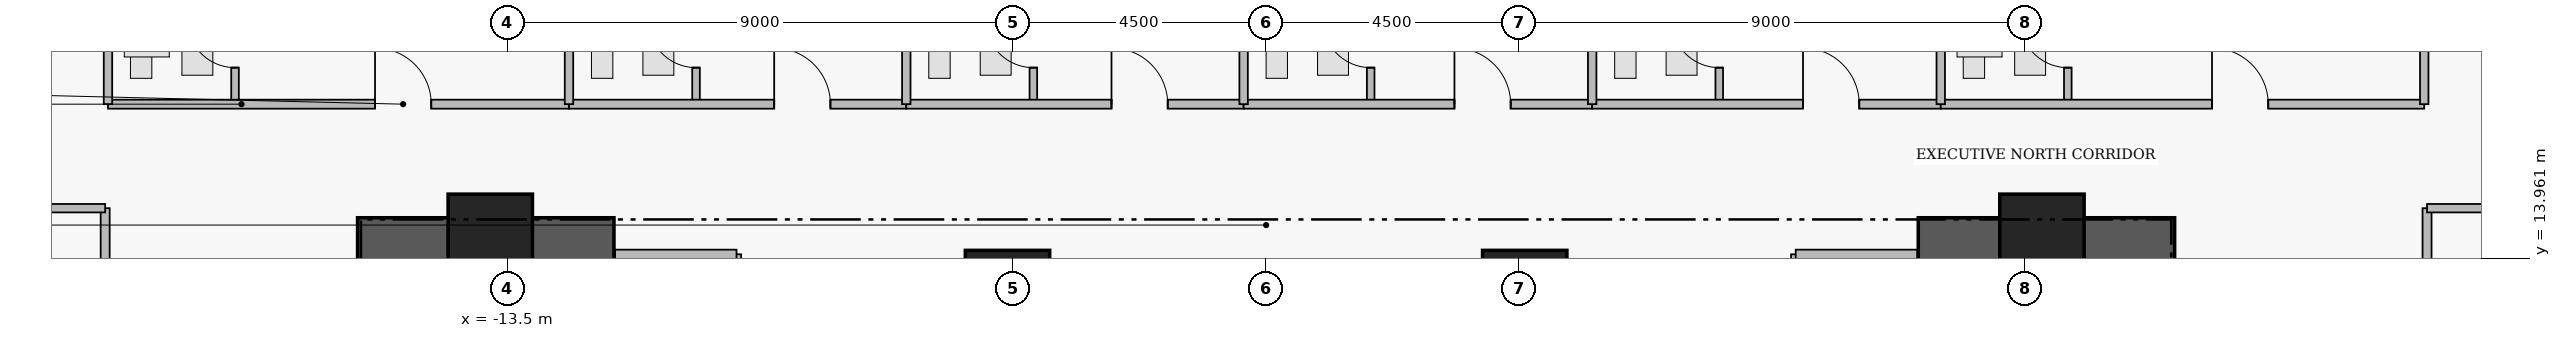
"""IFC4 building model, lengths in metres.
Left out: names, types, materials, properties, quantities, classifications, styles, units other than length and angle.
Written with IfcOpenShell. Run it as: python <this file> out.ifc"""

import sys

from ifc_helpers import new_model, si_unit, direction, frame, frame_2d, origin, origin_2d, place, context, subcontext, project, spatial, rectangle, extrude, element, fill, save


model = new_model("IFC4")
c1 = context("Model", 3, precision=1e-05, world=origin(), true_north=direction((0.0, 1.0)))
c2 = subcontext(c1, "Body", "Model", "MODEL_VIEW")
j1 = project(units=[si_unit("LENGTHUNIT", "METRE"), si_unit("PLANEANGLEUNIT", "RADIAN")], contexts=[c1])
p1 = place(None, origin())
s1 = spatial("IfcSite", under=j1, at=p1, CompositionType="ELEMENT")
p2 = place(p1, origin())
s2 = spatial("IfcBuilding", under=s1, at=p2, CompositionType="ELEMENT")
p3 = place(p2, frame((0.0, 0.0, 95.65)))
s3 = spatial("IfcBuildingStorey", under=s2, at=p3, CompositionType="ELEMENT", Elevation=95.65)
for number, where, z_axis, x_axis in (
    (1, (-16.16, 14.305, 0.0), (0.0, 0.0, 1.0), (1.0, 0.0, 0.0)),
    (2, (11.6, 14.305, 0.0), (0.0, 0.0, 1.0), (1.0, 0.0, 0.0)),
):
    element("IfcWall", number, at=place(p3, frame(where, z_axis=z_axis, x_axis=x_axis)), inside=s3, PredefinedType="SHEAR", context=c2, shape_type="SweptSolid", body=[
        extrude(rectangle(XDim=4.56, YDim=0.75, at=frame_2d((2.28, 0.0))), origin(), (0.0, 0.0, 1.0), 3.46),
    ])
for number, where, z_axis, x_axis in (
    (3, (-13.8, 14.35, 0.0), (0.0, 0.0, 1.0), (1.0, 0.0, 0.0)),
    (4, (-4.6, 13.35, 0.0), (0.0, 0.0, 1.0), (1.0, 0.0, 0.0)),
    (5, (4.6, 13.35, 0.0), (0.0, 0.0, 1.0), (1.0, 0.0, 0.0)),
    (6, (13.8, 14.35, 0.0), (0.0, 0.0, 1.0), (1.0, 0.0, 0.0)),
):
    element("IfcColumn", number, at=place(p3, frame(where, z_axis=z_axis, x_axis=x_axis)), inside=s3, PredefinedType="COLUMN", context=c2, shape_type="SweptSolid", body=[
        extrude(rectangle(XDim=1.5, YDim=1.5, at=origin_2d()), origin(), (0.0, 0.0, 1.0), 3.65),
    ])
p4 = place(p3, frame((-18.34, 16.7, 0.0), z_axis=(0.0, 0.0, 1.0), x_axis=(0.0, 1.0, 0.0)))
e7 = element("IfcWall", 7, at=p4, inside=s3, PredefinedType="PLUMBINGWALL", context=c2, shape_type="SweptSolid", body=[
    extrude(rectangle(XDim=2.36, YDim=0.135, at=frame_2d((1.18, 0.0))), origin(), (0.0, 0.0, 1.0), 3.43),
])
p5 = place(p4, frame((0.65, 0.0, 0.0)))
e8 = element("IfcOpeningElement", 8, at=p5, cuts=e7, PredefinedType="OPENING", context=c2, shape_type="SweptSolid", body=[
    extrude(rectangle(XDim=0.85, YDim=2.1, at=frame_2d((0.425, 1.05))), frame((0.0, 0.077, 0.0), z_axis=(0.0, -1.0, 0.0), x_axis=(1.0, 0.0, 0.0)), (0.0, 0.0, 1.0), 0.155),
])
p6 = place(p3, frame((-20.6, 16.7, 0.0), z_axis=(0.0, 0.0, 1.0), x_axis=(1.0, 0.0, 0.0)))
e9 = element("IfcWall", 9, at=p6, inside=s3, PredefinedType="PARTITIONING", context=c2, shape_type="SweptSolid", body=[
    extrude(rectangle(XDim=8.2, YDim=0.16, at=frame_2d((4.1, 0.0))), origin(), (0.0, 0.0, 1.0), 2.973),
])
p7 = place(p6, frame((4.75, 0.0, 0.0)))
e10 = element("IfcOpeningElement", 10, at=p7, cuts=e9, PredefinedType="OPENING", context=c2, shape_type="SweptSolid", body=[
    extrude(rectangle(XDim=1.0, YDim=2.15, at=frame_2d((0.5, 1.075))), frame((0.0, 0.09, 0.0), z_axis=(0.0, -1.0, 0.0), x_axis=(1.0, 0.0, 0.0)), (0.0, 0.0, 1.0), 0.18),
])
p8 = place(p3, frame((-10.14, 16.7, 0.0), z_axis=(0.0, 0.0, 1.0), x_axis=(0.0, 1.0, 0.0)))
e11 = element("IfcWall", 11, at=p8, inside=s3, PredefinedType="PLUMBINGWALL", context=c2, shape_type="SweptSolid", body=[
    extrude(rectangle(XDim=2.36, YDim=0.135, at=frame_2d((1.18, 0.0))), origin(), (0.0, 0.0, 1.0), 3.43),
])
p9 = place(p8, frame((0.65, 0.0, 0.0)))
e12 = element("IfcOpeningElement", 12, at=p9, cuts=e11, PredefinedType="OPENING", context=c2, shape_type="SweptSolid", body=[
    extrude(rectangle(XDim=0.85, YDim=2.1, at=frame_2d((0.425, 1.05))), frame((0.0, 0.077, 0.0), z_axis=(0.0, -1.0, 0.0), x_axis=(1.0, 0.0, 0.0)), (0.0, 0.0, 1.0), 0.155),
])
p10 = place(p3, frame((-12.4, 16.7, 0.0), z_axis=(0.0, 0.0, 1.0), x_axis=(1.0, 0.0, 0.0)))
e13 = element("IfcWall", 13, at=p10, inside=s3, PredefinedType="PARTITIONING", context=c2, shape_type="SweptSolid", body=[
    extrude(rectangle(XDim=6.0, YDim=0.16, at=frame_2d((3.0, 0.0))), origin(), (0.0, 0.0, 1.0), 2.973),
])
p11 = place(p10, frame((3.65, 0.0, 0.0)))
e14 = element("IfcOpeningElement", 14, at=p11, cuts=e13, PredefinedType="OPENING", context=c2, shape_type="SweptSolid", body=[
    extrude(rectangle(XDim=1.0, YDim=2.15, at=frame_2d((0.5, 1.075))), frame((0.0, 0.09, 0.0), z_axis=(0.0, -1.0, 0.0), x_axis=(1.0, 0.0, 0.0)), (0.0, 0.0, 1.0), 0.18),
])
p12 = place(p3, frame((-4.14, 16.7, 0.0), z_axis=(0.0, 0.0, 1.0), x_axis=(0.0, 1.0, 0.0)))
e15 = element("IfcWall", 15, at=p12, inside=s3, PredefinedType="PLUMBINGWALL", context=c2, shape_type="SweptSolid", body=[
    extrude(rectangle(XDim=2.36, YDim=0.135, at=frame_2d((1.18, 0.0))), origin(), (0.0, 0.0, 1.0), 2.503),
])
p13 = place(p12, frame((0.65, 0.0, 0.0)))
e16 = element("IfcOpeningElement", 16, at=p13, cuts=e15, PredefinedType="OPENING", context=c2, shape_type="SweptSolid", body=[
    extrude(rectangle(XDim=0.85, YDim=2.1, at=frame_2d((0.425, 1.05))), frame((0.0, 0.077, 0.0), z_axis=(0.0, -1.0, 0.0), x_axis=(1.0, 0.0, 0.0)), (0.0, 0.0, 1.0), 0.155),
])
p14 = place(p3, frame((-6.4, 16.7, 0.0), z_axis=(0.0, 0.0, 1.0), x_axis=(1.0, 0.0, 0.0)))
e17 = element("IfcWall", 17, at=p14, inside=s3, PredefinedType="PARTITIONING", context=c2, shape_type="SweptSolid", body=[
    extrude(rectangle(XDim=6.0, YDim=0.16, at=frame_2d((3.0, 0.0))), origin(), (0.0, 0.0, 1.0), 2.973),
])
p15 = place(p14, frame((3.65, 0.0, 0.0)))
e18 = element("IfcOpeningElement", 18, at=p15, cuts=e17, PredefinedType="OPENING", context=c2, shape_type="SweptSolid", body=[
    extrude(rectangle(XDim=1.0, YDim=2.15, at=frame_2d((0.5, 1.075))), frame((0.0, 0.09, 0.0), z_axis=(0.0, -1.0, 0.0), x_axis=(1.0, 0.0, 0.0)), (0.0, 0.0, 1.0), 0.18),
])
p16 = place(p3, frame((1.86, 16.7, 0.0), z_axis=(0.0, 0.0, 1.0), x_axis=(0.0, 1.0, 0.0)))
e19 = element("IfcWall", 19, at=p16, inside=s3, PredefinedType="PLUMBINGWALL", context=c2, shape_type="SweptSolid", body=[
    extrude(rectangle(XDim=2.36, YDim=0.135, at=frame_2d((1.18, 0.0))), origin(), (0.0, 0.0, 1.0), 3.43),
])
p17 = place(p16, frame((0.65, 0.0, 0.0)))
e20 = element("IfcOpeningElement", 20, at=p17, cuts=e19, PredefinedType="OPENING", context=c2, shape_type="SweptSolid", body=[
    extrude(rectangle(XDim=0.85, YDim=2.1, at=frame_2d((0.425, 1.05))), frame((0.0, 0.077, 0.0), z_axis=(0.0, -1.0, 0.0), x_axis=(1.0, 0.0, 0.0)), (0.0, 0.0, 1.0), 0.155),
])
p18 = place(p3, frame((-0.4, 16.7, 0.0), z_axis=(0.0, 0.0, 1.0), x_axis=(1.0, 0.0, 0.0)))
e21 = element("IfcWall", 21, at=p18, inside=s3, PredefinedType="PARTITIONING", context=c2, shape_type="SweptSolid", body=[
    extrude(rectangle(XDim=6.2, YDim=0.16, at=frame_2d((3.1, 0.0))), origin(), (0.0, 0.0, 1.0), 2.973),
])
p19 = place(p18, frame((3.75, 0.0, 0.0)))
e22 = element("IfcOpeningElement", 22, at=p19, cuts=e21, PredefinedType="OPENING", context=c2, shape_type="SweptSolid", body=[
    extrude(rectangle(XDim=1.0, YDim=2.15, at=frame_2d((0.5, 1.075))), frame((0.0, 0.09, 0.0), z_axis=(0.0, -1.0, 0.0), x_axis=(1.0, 0.0, 0.0)), (0.0, 0.0, 1.0), 0.18),
])
p20 = place(p3, frame((8.06, 16.7, 0.0), z_axis=(0.0, 0.0, 1.0), x_axis=(0.0, 1.0, 0.0)))
e23 = element("IfcWall", 23, at=p20, inside=s3, PredefinedType="PLUMBINGWALL", context=c2, shape_type="SweptSolid", body=[
    extrude(rectangle(XDim=2.36, YDim=0.135, at=frame_2d((1.18, 0.0))), origin(), (0.0, 0.0, 1.0), 3.43),
])
p21 = place(p20, frame((0.65, 0.0, 0.0)))
e24 = element("IfcOpeningElement", 24, at=p21, cuts=e23, PredefinedType="OPENING", context=c2, shape_type="SweptSolid", body=[
    extrude(rectangle(XDim=0.85, YDim=2.1, at=frame_2d((0.425, 1.05))), frame((0.0, 0.077, 0.0), z_axis=(0.0, -1.0, 0.0), x_axis=(1.0, 0.0, 0.0)), (0.0, 0.0, 1.0), 0.155),
])
p22 = place(p3, frame((5.8, 16.7, 0.0), z_axis=(0.0, 0.0, 1.0), x_axis=(1.0, 0.0, 0.0)))
e25 = element("IfcWall", 25, at=p22, inside=s3, PredefinedType="PARTITIONING", context=c2, shape_type="SweptSolid", body=[
    extrude(rectangle(XDim=6.2, YDim=0.16, at=frame_2d((3.1, 0.0))), origin(), (0.0, 0.0, 1.0), 2.973),
])
p23 = place(p22, frame((3.75, 0.0, 0.0)))
e26 = element("IfcOpeningElement", 26, at=p23, cuts=e25, PredefinedType="OPENING", context=c2, shape_type="SweptSolid", body=[
    extrude(rectangle(XDim=1.0, YDim=2.15, at=frame_2d((0.5, 1.075))), frame((0.0, 0.09, 0.0), z_axis=(0.0, -1.0, 0.0), x_axis=(1.0, 0.0, 0.0)), (0.0, 0.0, 1.0), 0.18),
])
p24 = place(p3, frame((14.26, 16.7, 0.0), z_axis=(0.0, 0.0, 1.0), x_axis=(0.0, 1.0, 0.0)))
e27 = element("IfcWall", 27, at=p24, inside=s3, PredefinedType="PLUMBINGWALL", context=c2, shape_type="SweptSolid", body=[
    extrude(rectangle(XDim=2.36, YDim=0.135, at=frame_2d((1.18, 0.0))), origin(), (0.0, 0.0, 1.0), 2.503),
])
p25 = place(p24, frame((0.65, 0.0, 0.0)))
e28 = element("IfcOpeningElement", 28, at=p25, cuts=e27, PredefinedType="OPENING", context=c2, shape_type="SweptSolid", body=[
    extrude(rectangle(XDim=0.85, YDim=2.1, at=frame_2d((0.425, 1.05))), frame((0.0, 0.077, 0.0), z_axis=(0.0, -1.0, 0.0), x_axis=(1.0, 0.0, 0.0)), (0.0, 0.0, 1.0), 0.155),
])
p26 = place(p3, frame((12.0, 16.7, 0.0), z_axis=(0.0, 0.0, 1.0), x_axis=(1.0, 0.0, 0.0)))
e29 = element("IfcWall", 29, at=p26, inside=s3, PredefinedType="PARTITIONING", context=c2, shape_type="SweptSolid", body=[
    extrude(rectangle(XDim=8.6, YDim=0.16, at=frame_2d((4.3, 0.0))), origin(), (0.0, 0.0, 1.0), 2.973),
])
p27 = place(p26, frame((4.825, 0.0, 0.0)))
e30 = element("IfcOpeningElement", 30, at=p27, cuts=e29, PredefinedType="OPENING", context=c2, shape_type="SweptSolid", body=[
    extrude(rectangle(XDim=1.0, YDim=2.15, at=frame_2d((0.5, 1.075))), frame((0.0, 0.09, 0.0), z_axis=(0.0, -1.0, 0.0), x_axis=(1.0, 0.0, 0.0)), (0.0, 0.0, 1.0), 0.18),
])
p28 = place(p3, frame((20.65, 7.96, 0.0), z_axis=(0.0, 0.0, 1.0), x_axis=(0.0, 1.0, 0.0)))
e31 = element("IfcWall", 31, at=p28, inside=s3, PredefinedType="PARTITIONING", context=c2, shape_type="SweptSolid", body=[
    extrude(rectangle(XDim=6.89, YDim=0.16, at=frame_2d((3.445, 0.0))), origin(), (0.0, 0.0, 1.0), 3.43),
])
p29 = place(p28, frame((2.985, 0.0, 0.0)))
e32 = element("IfcOpeningElement", 32, at=p29, cuts=e31, PredefinedType="OPENING", context=c2, shape_type="SweptSolid", body=[
    extrude(rectangle(XDim=0.92, YDim=2.12, at=frame_2d((0.46, 1.06))), frame((0.0, 0.09, 0.0), z_axis=(0.0, -1.0, 0.0), x_axis=(1.0, 0.0, 0.0)), (0.0, 0.0, 1.0), 0.18),
])
p30 = place(p3, frame((-20.65, 8.06, 0.0), z_axis=(0.0, 0.0, 1.0), x_axis=(0.0, 1.0, 0.0)))
e33 = element("IfcWall", 33, at=p30, inside=s3, PredefinedType="PARTITIONING", context=c2, shape_type="SweptSolid", body=[
    extrude(rectangle(XDim=6.79, YDim=0.16, at=frame_2d((3.395, 0.0))), origin(), (0.0, 0.0, 1.0), 3.43),
])
p31 = place(p30, frame((2.92, 0.0, 0.0)))
e34 = element("IfcOpeningElement", 34, at=p31, cuts=e33, PredefinedType="OPENING", context=c2, shape_type="SweptSolid", body=[
    extrude(rectangle(XDim=0.95, YDim=2.15, at=frame_2d((0.475, 1.075))), frame((0.0, 0.09, 0.0), z_axis=(0.0, -1.0, 0.0), x_axis=(1.0, 0.0, 0.0)), (0.0, 0.0, 1.0), 0.18),
])
p32 = place(p3, frame((-9.42, 11.07, 0.0), z_axis=(0.0, 0.0, 1.0), x_axis=(0.0, 1.0, 0.0)))
e35 = element("IfcWall", 35, at=p32, inside=s3, PredefinedType="PARTITIONING", context=c2, shape_type="SweptSolid", body=[
    extrude(rectangle(XDim=2.96, YDim=0.165, at=frame_2d((1.48, 0.0))), origin(), (0.0, 0.0, 1.0), 3.43),
])
p33 = place(p3, frame((-11.58, 14.03, 0.0), z_axis=(0.0, 0.0, 1.0), x_axis=(1.0, 0.0, 0.0)))
e36 = element("IfcWall", 36, at=p33, inside=s3, PredefinedType="PARTITIONING", context=c2, shape_type="SweptSolid", body=[
    extrude(rectangle(XDim=2.16, YDim=0.165, at=frame_2d((1.08, 0.0))), origin(), (0.0, 0.0, 1.0), 3.43),
])
p34 = place(p3, frame((9.42, 11.07, 0.0), z_axis=(0.0, 0.0, 1.0), x_axis=(0.0, 1.0, 0.0)))
e37 = element("IfcWall", 37, at=p34, inside=s3, PredefinedType="PARTITIONING", context=c2, shape_type="SweptSolid", body=[
    extrude(rectangle(XDim=2.96, YDim=0.165, at=frame_2d((1.48, 0.0))), origin(), (0.0, 0.0, 1.0), 3.43),
])
p35 = place(p3, frame((9.42, 14.03, 0.0), z_axis=(0.0, 0.0, 1.0), x_axis=(1.0, 0.0, 0.0)))
e38 = element("IfcWall", 38, at=p35, inside=s3, PredefinedType="PARTITIONING", context=c2, shape_type="SweptSolid", body=[
    extrude(rectangle(XDim=2.16, YDim=0.165, at=frame_2d((1.08, 0.0))), origin(), (0.0, 0.0, 1.0), 3.43),
])
p36 = place(p3, frame((-20.6, 16.7, 0.0), z_axis=(0.0, 0.0, 1.0), x_axis=(0.0, 1.0, 0.0)))
e39 = element("IfcWall", 39, at=p36, inside=s3, PredefinedType="PARTITIONING", context=c2, shape_type="SweptSolid", body=[
    extrude(rectangle(XDim=8.2, YDim=0.15, at=frame_2d((4.1, 0.0))), origin(), (0.0, 0.0, 1.0), 3.43),
])
for number, where, z_axis, x_axis in (
    (40, (-12.4, 16.7, 0.0), (0.0, 0.0, 1.0), (0.0, 1.0, 0.0)),
    (41, (-6.4, 16.7, 0.0), (0.0, 0.0, 1.0), (0.0, 1.0, 0.0)),
    (42, (-0.4, 16.7, 0.0), (0.0, 0.0, 1.0), (0.0, 1.0, 0.0)),
    (43, (5.8, 16.7, 0.0), (0.0, 0.0, 1.0), (0.0, 1.0, 0.0)),
    (44, (12.0, 16.7, 0.0), (0.0, 0.0, 1.0), (0.0, 1.0, 0.0)),
):
    element("IfcWall", number, at=place(p3, frame(where, z_axis=z_axis, x_axis=x_axis)), inside=s3, PredefinedType="PARTITIONING", context=c2, shape_type="SweptSolid", body=[
        extrude(rectangle(XDim=11.62, YDim=0.15, at=frame_2d((5.81, 0.0))), origin(), (0.0, 0.0, 1.0), 3.43),
    ])
p37 = place(p3, frame((20.6, 16.7, 0.0), z_axis=(0.0, 0.0, 1.0), x_axis=(0.0, 1.0, 0.0)))
e45 = element("IfcWall", 45, at=p37, inside=s3, PredefinedType="PARTITIONING", context=c2, shape_type="SweptSolid", body=[
    extrude(rectangle(XDim=8.2, YDim=0.15, at=frame_2d((4.1, 0.0))), origin(), (0.0, 0.0, 1.0), 3.43),
])
for number, where, z_axis, x_axis in (
    (46, (20.65, 14.85, 0.0), (0.0, 0.0, 1.0), (1.0, 0.0, 0.0)),
    (47, (-23.84, 14.85, 0.0), (0.0, 0.0, 1.0), (1.0, 0.0, 0.0)),
):
    element("IfcWall", number, at=place(p3, frame(where, z_axis=z_axis, x_axis=x_axis)), inside=s3, PredefinedType="PARTITIONING", context=c2, shape_type="SweptSolid", body=[
        extrude(rectangle(XDim=3.19, YDim=0.15, at=frame_2d((1.595, 0.0))), origin(), (0.0, 0.0, 1.0), 3.43),
    ])
p38 = place(p5, origin())
e48 = element("IfcDoor", 48, at=p38, inside=s3, OperationType="SINGLE_SWING_RIGHT", PredefinedType="DOOR", context=c2, shape_type="SweptSolid", body=[
    extrude(rectangle(XDim=0.85, YDim=2.1, at=frame_2d((0.425, 1.05))), frame((0.0, 0.025, 0.0), z_axis=(0.0, -1.0, 0.0), x_axis=(1.0, 0.0, 0.0)), (0.0, 0.0, 1.0), 0.05),
])
fill(e8, e48)
p39 = place(p7, origin())
e49 = element("IfcDoor", 49, at=p39, inside=s3, OperationType="SINGLE_SWING_LEFT", PredefinedType="DOOR", context=c2, shape_type="SweptSolid", body=[
    extrude(rectangle(XDim=1.0, YDim=2.15, at=frame_2d((0.5, 1.075))), frame((0.0, 0.025, 0.0), z_axis=(0.0, -1.0, 0.0), x_axis=(1.0, 0.0, 0.0)), (0.0, 0.0, 1.0), 0.05),
])
fill(e10, e49)
p40 = place(p9, origin())
e50 = element("IfcDoor", 50, at=p40, inside=s3, OperationType="SINGLE_SWING_RIGHT", PredefinedType="DOOR", context=c2, shape_type="SweptSolid", body=[
    extrude(rectangle(XDim=0.85, YDim=2.1, at=frame_2d((0.425, 1.05))), frame((0.0, 0.025, 0.0), z_axis=(0.0, -1.0, 0.0), x_axis=(1.0, 0.0, 0.0)), (0.0, 0.0, 1.0), 0.05),
])
fill(e12, e50)
p41 = place(p11, origin())
e51 = element("IfcDoor", 51, at=p41, inside=s3, OperationType="SINGLE_SWING_LEFT", PredefinedType="DOOR", context=c2, shape_type="SweptSolid", body=[
    extrude(rectangle(XDim=1.0, YDim=2.15, at=frame_2d((0.5, 1.075))), frame((0.0, 0.025, 0.0), z_axis=(0.0, -1.0, 0.0), x_axis=(1.0, 0.0, 0.0)), (0.0, 0.0, 1.0), 0.05),
])
fill(e14, e51)
p42 = place(p13, origin())
e52 = element("IfcDoor", 52, at=p42, inside=s3, OperationType="SINGLE_SWING_RIGHT", PredefinedType="DOOR", context=c2, shape_type="SweptSolid", body=[
    extrude(rectangle(XDim=0.85, YDim=2.1, at=frame_2d((0.425, 1.05))), frame((0.0, 0.025, 0.0), z_axis=(0.0, -1.0, 0.0), x_axis=(1.0, 0.0, 0.0)), (0.0, 0.0, 1.0), 0.05),
])
fill(e16, e52)
p43 = place(p15, origin())
e53 = element("IfcDoor", 53, at=p43, inside=s3, OperationType="SINGLE_SWING_LEFT", PredefinedType="DOOR", context=c2, shape_type="SweptSolid", body=[
    extrude(rectangle(XDim=1.0, YDim=2.15, at=frame_2d((0.5, 1.075))), frame((0.0, 0.025, 0.0), z_axis=(0.0, -1.0, 0.0), x_axis=(1.0, 0.0, 0.0)), (0.0, 0.0, 1.0), 0.05),
])
fill(e18, e53)
p44 = place(p17, origin())
e54 = element("IfcDoor", 54, at=p44, inside=s3, OperationType="SINGLE_SWING_RIGHT", PredefinedType="DOOR", context=c2, shape_type="SweptSolid", body=[
    extrude(rectangle(XDim=0.85, YDim=2.1, at=frame_2d((0.425, 1.05))), frame((0.0, 0.025, 0.0), z_axis=(0.0, -1.0, 0.0), x_axis=(1.0, 0.0, 0.0)), (0.0, 0.0, 1.0), 0.05),
])
fill(e20, e54)
p45 = place(p19, origin())
e55 = element("IfcDoor", 55, at=p45, inside=s3, OperationType="SINGLE_SWING_LEFT", PredefinedType="DOOR", context=c2, shape_type="SweptSolid", body=[
    extrude(rectangle(XDim=1.0, YDim=2.15, at=frame_2d((0.5, 1.075))), frame((0.0, 0.025, 0.0), z_axis=(0.0, -1.0, 0.0), x_axis=(1.0, 0.0, 0.0)), (0.0, 0.0, 1.0), 0.05),
])
fill(e22, e55)
p46 = place(p21, origin())
e56 = element("IfcDoor", 56, at=p46, inside=s3, OperationType="SINGLE_SWING_RIGHT", PredefinedType="DOOR", context=c2, shape_type="SweptSolid", body=[
    extrude(rectangle(XDim=0.85, YDim=2.1, at=frame_2d((0.425, 1.05))), frame((0.0, 0.025, 0.0), z_axis=(0.0, -1.0, 0.0), x_axis=(1.0, 0.0, 0.0)), (0.0, 0.0, 1.0), 0.05),
])
fill(e24, e56)
p47 = place(p23, origin())
e57 = element("IfcDoor", 57, at=p47, inside=s3, OperationType="SINGLE_SWING_LEFT", PredefinedType="DOOR", context=c2, shape_type="SweptSolid", body=[
    extrude(rectangle(XDim=1.0, YDim=2.15, at=frame_2d((0.5, 1.075))), frame((0.0, 0.025, 0.0), z_axis=(0.0, -1.0, 0.0), x_axis=(1.0, 0.0, 0.0)), (0.0, 0.0, 1.0), 0.05),
])
fill(e26, e57)
p48 = place(p25, origin())
e58 = element("IfcDoor", 58, at=p48, inside=s3, OperationType="SINGLE_SWING_RIGHT", PredefinedType="DOOR", context=c2, shape_type="SweptSolid", body=[
    extrude(rectangle(XDim=0.85, YDim=2.1, at=frame_2d((0.425, 1.05))), frame((0.0, 0.025, 0.0), z_axis=(0.0, -1.0, 0.0), x_axis=(1.0, 0.0, 0.0)), (0.0, 0.0, 1.0), 0.05),
])
fill(e28, e58)
p49 = place(p27, origin())
e59 = element("IfcDoor", 59, at=p49, inside=s3, OperationType="SINGLE_SWING_LEFT", PredefinedType="DOOR", context=c2, shape_type="SweptSolid", body=[
    extrude(rectangle(XDim=1.0, YDim=2.15, at=frame_2d((0.5, 1.075))), frame((0.0, 0.025, 0.0), z_axis=(0.0, -1.0, 0.0), x_axis=(1.0, 0.0, 0.0)), (0.0, 0.0, 1.0), 0.05),
])
fill(e30, e59)
save(model, sys.argv[1])
